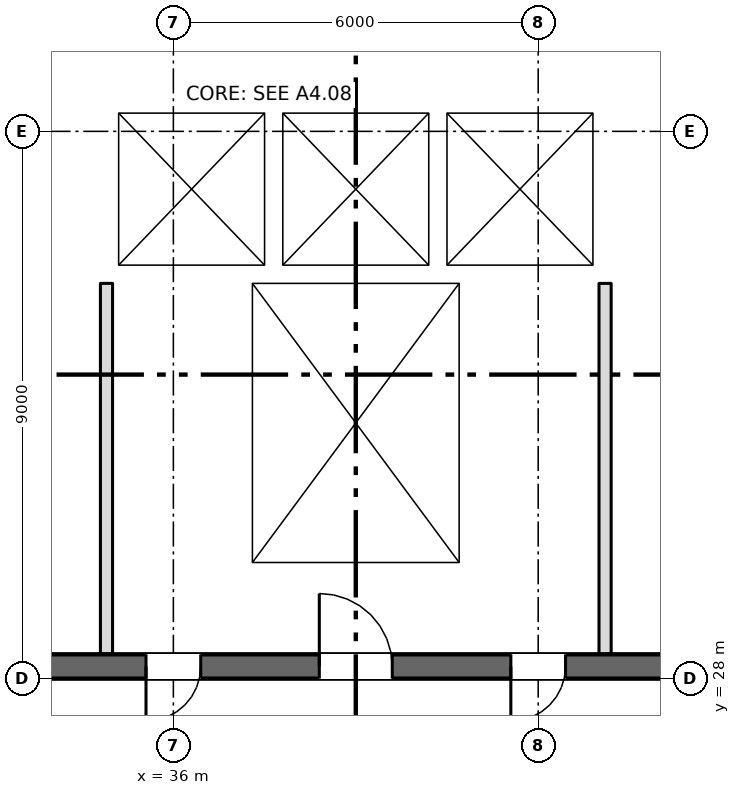
"""IFC4 building model, lengths in metres.
Left out: names, types, materials, properties, quantities, classifications, styles, units other than length and angle.
Written with IfcOpenShell. Run it as: python <this file> out.ifc"""

import sys

from ifc_helpers import new_model, si_unit, direction, frame, frame_2d, origin, place, context, subcontext, project, spatial, rectangle, extrude, element, fill, save


model = new_model("IFC4")
c1 = context("Model", 3, precision=1e-05, world=origin(), true_north=direction((0.0, 1.0)))
c2 = subcontext(c1, "Body", "Model", "MODEL_VIEW")
j1 = project(units=[si_unit("LENGTHUNIT", "METRE"), si_unit("PLANEANGLEUNIT", "RADIAN")], contexts=[c1])
p1 = place(None, origin())
s1 = spatial("IfcSite", under=j1, at=p1, CompositionType="ELEMENT")
p2 = place(p1, origin())
s2 = spatial("IfcBuilding", under=s1, at=p2, CompositionType="ELEMENT")
p3 = place(p2, frame((0.0, 0.0, 30.0)))
s3 = spatial("IfcBuildingStorey", under=s2, at=p3, CompositionType="ELEMENT", Elevation=30.0)
p4 = place(p3, frame((6.7, 28.2, 0.0), z_axis=(0.0, 0.0, 1.0), x_axis=(1.0, 0.0, 0.0)))
e1 = element("IfcWall", 1, at=p4, inside=s3, PredefinedType="SHEAR", context=c2, shape_type="SweptSolid", body=[
    extrude(rectangle(XDim=57.8, YDim=0.4, at=frame_2d((28.9, 0.0))), origin(), (0.0, 0.0, 1.0), 3.35),
])
p5 = place(p4, frame((12.062, 0.0, 0.0)))
e2 = element("IfcOpeningElement", 2, at=p5, cuts=e1, PredefinedType="OPENING", context=c2, shape_type="SweptSolid", body=[
    extrude(rectangle(XDim=0.9, YDim=2.1, at=frame_2d((0.45, 1.05))), frame((0.0, 0.21, 0.0), z_axis=(0.0, -1.0, 0.0), x_axis=(1.0, 0.0, 0.0)), (0.0, 0.0, 1.0), 0.42),
])
p6 = place(p4, frame((14.637, 0.0, 0.0)))
e3 = element("IfcOpeningElement", 3, at=p6, cuts=e1, PredefinedType="OPENING", context=c2, shape_type="SweptSolid", body=[
    extrude(rectangle(XDim=0.9, YDim=2.1, at=frame_2d((0.45, 1.05))), frame((0.0, 0.21, 0.0), z_axis=(0.0, -1.0, 0.0), x_axis=(1.0, 0.0, 0.0)), (0.0, 0.0, 1.0), 0.42),
])
p7 = place(p4, frame((49.062, 0.0, 0.0)))
e4 = element("IfcOpeningElement", 4, at=p7, cuts=e1, PredefinedType="OPENING", context=c2, shape_type="SweptSolid", body=[
    extrude(rectangle(XDim=0.9, YDim=2.1, at=frame_2d((0.45, 1.05))), frame((0.0, 0.21, 0.0), z_axis=(0.0, -1.0, 0.0), x_axis=(1.0, 0.0, 0.0)), (0.0, 0.0, 1.0), 0.42),
])
p8 = place(p4, frame((51.637, 0.0, 0.0)))
e5 = element("IfcOpeningElement", 5, at=p8, cuts=e1, PredefinedType="OPENING", context=c2, shape_type="SweptSolid", body=[
    extrude(rectangle(XDim=0.9, YDim=2.1, at=frame_2d((0.45, 1.05))), frame((0.0, 0.21, 0.0), z_axis=(0.0, -1.0, 0.0), x_axis=(1.0, 0.0, 0.0)), (0.0, 0.0, 1.0), 0.42),
])
p9 = place(p4, frame((1.35, 0.0, 0.0)))
e6 = element("IfcOpeningElement", 6, at=p9, cuts=e1, PredefinedType="OPENING", context=c2, shape_type="SweptSolid", body=[
    extrude(rectangle(XDim=0.9, YDim=2.1, at=frame_2d((0.45, 1.05))), frame((0.0, 0.21, 0.0), z_axis=(0.0, -1.0, 0.0), x_axis=(1.0, 0.0, 0.0)), (0.0, 0.0, 1.0), 0.42),
])
p10 = place(p4, frame((4.7, 0.0, 0.0)))
e7 = element("IfcOpeningElement", 7, at=p10, cuts=e1, PredefinedType="OPENING", context=c2, shape_type="SweptSolid", body=[
    extrude(rectangle(XDim=1.2, YDim=2.1, at=frame_2d((0.6, 1.05))), frame((0.0, 0.21, 0.0), z_axis=(0.0, -1.0, 0.0), x_axis=(1.0, 0.0, 0.0)), (0.0, 0.0, 1.0), 0.42),
])
p11 = place(p4, frame((31.7, 0.0, 0.0)))
e8 = element("IfcOpeningElement", 8, at=p11, cuts=e1, PredefinedType="OPENING", context=c2, shape_type="SweptSolid", body=[
    extrude(rectangle(XDim=1.2, YDim=2.1, at=frame_2d((0.6, 1.05))), frame((0.0, 0.21, 0.0), z_axis=(0.0, -1.0, 0.0), x_axis=(1.0, 0.0, 0.0)), (0.0, 0.0, 1.0), 0.42),
])
p12 = place(p4, frame((55.2, 0.0, 0.0)))
e9 = element("IfcOpeningElement", 9, at=p12, cuts=e1, PredefinedType="OPENING", context=c2, shape_type="SweptSolid", body=[
    extrude(rectangle(XDim=1.2, YDim=2.1, at=frame_2d((0.6, 1.05))), frame((0.0, 0.21, 0.0), z_axis=(0.0, -1.0, 0.0), x_axis=(1.0, 0.0, 0.0)), (0.0, 0.0, 1.0), 0.42),
])
p13 = place(p4, frame((21.7, 0.0, 0.0)))
e10 = element("IfcOpeningElement", 10, at=p13, cuts=e1, PredefinedType="OPENING", context=c2, shape_type="SweptSolid", body=[
    extrude(rectangle(XDim=1.2, YDim=2.1, at=frame_2d((0.6, 1.05))), frame((0.0, 0.21, 0.0), z_axis=(0.0, -1.0, 0.0), x_axis=(1.0, 0.0, 0.0)), (0.0, 0.0, 1.0), 0.42),
])
p14 = place(p4, frame((41.7, 0.0, 0.0)))
e11 = element("IfcOpeningElement", 11, at=p14, cuts=e1, PredefinedType="OPENING", context=c2, shape_type="SweptSolid", body=[
    extrude(rectangle(XDim=1.2, YDim=2.1, at=frame_2d((0.6, 1.05))), frame((0.0, 0.21, 0.0), z_axis=(0.0, -1.0, 0.0), x_axis=(1.0, 0.0, 0.0)), (0.0, 0.0, 1.0), 0.42),
])
p15 = place(p4, frame((24.85, 0.0, 0.0)))
e12 = element("IfcOpeningElement", 12, at=p15, cuts=e1, PredefinedType="OPENING", context=c2, shape_type="SweptSolid", body=[
    extrude(rectangle(XDim=2.4, YDim=2.1, at=frame_2d((1.2, 1.05))), frame((0.0, 0.21, 0.0), z_axis=(0.0, -1.0, 0.0), x_axis=(1.0, 0.0, 0.0)), (0.0, 0.0, 1.0), 0.42),
])
p16 = place(p4, frame((37.35, 0.0, 0.0)))
e13 = element("IfcOpeningElement", 13, at=p16, cuts=e1, PredefinedType="OPENING", context=c2, shape_type="SweptSolid", body=[
    extrude(rectangle(XDim=2.4, YDim=2.1, at=frame_2d((1.2, 1.05))), frame((0.0, 0.21, 0.0), z_axis=(0.0, -1.0, 0.0), x_axis=(1.0, 0.0, 0.0)), (0.0, 0.0, 1.0), 0.42),
])
p17 = place(p4, frame((7.85, 0.0, 0.0)))
e14 = element("IfcOpeningElement", 14, at=p17, cuts=e1, PredefinedType="OPENING", context=c2, shape_type="SweptSolid", body=[
    extrude(rectangle(XDim=2.4, YDim=2.1, at=frame_2d((1.2, 1.05))), frame((0.0, 0.21, 0.0), z_axis=(0.0, -1.0, 0.0), x_axis=(1.0, 0.0, 0.0)), (0.0, 0.0, 1.0), 0.42),
])
p18 = place(p4, frame((28.85, 0.0, 0.0)))
e15 = element("IfcOpeningElement", 15, at=p18, cuts=e1, PredefinedType="OPENING", context=c2, shape_type="SweptSolid", body=[
    extrude(rectangle(XDim=0.9, YDim=2.1, at=frame_2d((0.45, 1.05))), frame((0.0, 0.21, 0.0), z_axis=(0.0, -1.0, 0.0), x_axis=(1.0, 0.0, 0.0)), (0.0, 0.0, 1.0), 0.42),
])
p19 = place(p4, frame((34.85, 0.0, 0.0)))
e16 = element("IfcOpeningElement", 16, at=p19, cuts=e1, PredefinedType="OPENING", context=c2, shape_type="SweptSolid", body=[
    extrude(rectangle(XDim=0.9, YDim=2.1, at=frame_2d((0.45, 1.05))), frame((0.0, 0.21, 0.0), z_axis=(0.0, -1.0, 0.0), x_axis=(1.0, 0.0, 0.0)), (0.0, 0.0, 1.0), 0.42),
])
for number, where, z_axis, x_axis in (
    (17, (37.15, 28.4, 0.0), (0.0, 0.0, 1.0), (0.0, 1.0, 0.0)),
    (18, (40.85, 28.4, 0.0), (0.0, 0.0, 1.0), (0.0, 1.0, 0.0)),
):
    element("IfcWall", number, at=place(p3, frame(where, z_axis=z_axis, x_axis=x_axis)), inside=s3, PredefinedType="SHEAR", context=c2, shape_type="SweptSolid", body=[
        extrude(rectangle(XDim=6.1, YDim=0.3, at=frame_2d((3.05, 0.0))), origin(), (0.0, 0.0, 1.0), 3.35),
    ])
p20 = place(p3, frame((34.8, 34.65, 0.0), z_axis=(0.0, 0.0, 1.0), x_axis=(1.0, 0.0, 0.0)))
e19 = element("IfcWall", 19, at=p20, inside=s3, PredefinedType="SHEAR", context=c2, shape_type="SweptSolid", body=[
    extrude(rectangle(XDim=8.4, YDim=0.3, at=frame_2d((4.2, 0.0))), origin(), (0.0, 0.0, 1.0), 3.35),
])
p21 = place(p3, frame((34.8, 37.45, 0.0), z_axis=(0.0, 0.0, 1.0), x_axis=(1.0, 0.0, 0.0)))
e20 = element("IfcWall", 20, at=p21, inside=s3, PredefinedType="SHEAR", context=c2, shape_type="SweptSolid", body=[
    extrude(rectangle(XDim=8.4, YDim=0.3, at=frame_2d((4.2, 0.0))), origin(), (0.0, 0.0, 1.0), 3.35),
])
p22 = place(p21, frame((0.95, 0.0, 0.0)))
e21 = element("IfcOpeningElement", 21, at=p22, cuts=e20, PredefinedType="OPENING", context=c2, shape_type="SweptSolid", body=[
    extrude(rectangle(XDim=1.1, YDim=2.1, at=frame_2d((0.55, 1.05))), frame((0.0, 0.16, 0.0), z_axis=(0.0, -1.0, 0.0), x_axis=(1.0, 0.0, 0.0)), (0.0, 0.0, 1.0), 0.32),
])
p23 = place(p21, frame((3.65, 0.0, 0.0)))
e22 = element("IfcOpeningElement", 22, at=p23, cuts=e20, PredefinedType="OPENING", context=c2, shape_type="SweptSolid", body=[
    extrude(rectangle(XDim=1.1, YDim=2.1, at=frame_2d((0.55, 1.05))), frame((0.0, 0.16, 0.0), z_axis=(0.0, -1.0, 0.0), x_axis=(1.0, 0.0, 0.0)), (0.0, 0.0, 1.0), 0.32),
])
p24 = place(p21, frame((6.35, 0.0, 0.0)))
e23 = element("IfcOpeningElement", 23, at=p24, cuts=e20, PredefinedType="OPENING", context=c2, shape_type="SweptSolid", body=[
    extrude(rectangle(XDim=1.1, YDim=2.1, at=frame_2d((0.55, 1.05))), frame((0.0, 0.16, 0.0), z_axis=(0.0, -1.0, 0.0), x_axis=(1.0, 0.0, 0.0)), (0.0, 0.0, 1.0), 0.32),
])
for number, where, z_axis, x_axis in (
    (24, (34.95, 34.8, 0.0), (0.0, 0.0, 1.0), (0.0, 1.0, 0.0)),
    (25, (43.05, 34.8, 0.0), (0.0, 0.0, 1.0), (0.0, 1.0, 0.0)),
    (26, (37.65, 34.8, 0.0), (0.0, 0.0, 1.0), (0.0, 1.0, 0.0)),
    (27, (40.35, 34.8, 0.0), (0.0, 0.0, 1.0), (0.0, 1.0, 0.0)),
):
    element("IfcWall", number, at=place(p3, frame(where, z_axis=z_axis, x_axis=x_axis)), inside=s3, PredefinedType="SHEAR", context=c2, shape_type="SweptSolid", body=[
        extrude(rectangle(XDim=2.5, YDim=0.3, at=frame_2d((1.25, 0.0))), origin(), (0.0, 0.0, 1.0), 3.35),
    ])
for number, where, z_axis, x_axis in (
    (28, (34.9, 28.4, 0.0), (0.0, 0.0, 1.0), (0.0, 1.0, 0.0)),
    (29, (43.1, 28.4, 0.0), (0.0, 0.0, 1.0), (0.0, 1.0, 0.0)),
):
    element("IfcWall", number, at=place(p3, frame(where, z_axis=z_axis, x_axis=x_axis)), inside=s3, PredefinedType="PARTITIONING", context=c2, shape_type="SweptSolid", body=[
        extrude(rectangle(XDim=6.1, YDim=0.2, at=frame_2d((3.05, 0.0))), origin(), (0.0, 0.0, 1.0), 3.35),
    ])
p25 = place(p22, origin())
e30 = element("IfcDoor", 30, at=p25, inside=s3, OperationType="SLIDING_TO_LEFT", PredefinedType="DOOR", context=c2, shape_type="SweptSolid", body=[
    extrude(rectangle(XDim=1.1, YDim=2.1, at=frame_2d((0.55, 1.05))), frame((0.0, 0.025, 0.0), z_axis=(0.0, -1.0, 0.0), x_axis=(1.0, 0.0, 0.0)), (0.0, 0.0, 1.0), 0.05),
])
fill(e21, e30)
p26 = place(p23, origin())
e31 = element("IfcDoor", 31, at=p26, inside=s3, OperationType="SLIDING_TO_LEFT", PredefinedType="DOOR", context=c2, shape_type="SweptSolid", body=[
    extrude(rectangle(XDim=1.1, YDim=2.1, at=frame_2d((0.55, 1.05))), frame((0.0, 0.025, 0.0), z_axis=(0.0, -1.0, 0.0), x_axis=(1.0, 0.0, 0.0)), (0.0, 0.0, 1.0), 0.05),
])
fill(e22, e31)
p27 = place(p24, origin())
e32 = element("IfcDoor", 32, at=p27, inside=s3, OperationType="SLIDING_TO_LEFT", PredefinedType="DOOR", context=c2, shape_type="SweptSolid", body=[
    extrude(rectangle(XDim=1.1, YDim=2.1, at=frame_2d((0.55, 1.05))), frame((0.0, 0.025, 0.0), z_axis=(0.0, -1.0, 0.0), x_axis=(1.0, 0.0, 0.0)), (0.0, 0.0, 1.0), 0.05),
])
fill(e23, e32)
p28 = place(p11, origin())
e33 = element("IfcDoor", 33, at=p28, inside=s3, OperationType="SINGLE_SWING_LEFT", PredefinedType="DOOR", context=c2, shape_type="SweptSolid", body=[
    extrude(rectangle(XDim=1.2, YDim=2.1, at=frame_2d((0.6, 1.05))), frame((0.0, 0.025, 0.0), z_axis=(0.0, -1.0, 0.0), x_axis=(1.0, 0.0, 0.0)), (0.0, 0.0, 1.0), 0.05),
])
fill(e8, e33)
p29 = place(p18, origin())
e34 = element("IfcDoor", 34, at=p29, inside=s3, OperationType="SINGLE_SWING_LEFT", PredefinedType="DOOR", context=c2, shape_type="SweptSolid", body=[
    extrude(rectangle(XDim=0.9, YDim=2.1, at=frame_2d((0.45, 1.05))), frame((0.0, 0.025, 0.0), z_axis=(0.0, -1.0, 0.0), x_axis=(1.0, 0.0, 0.0)), (0.0, 0.0, 1.0), 0.05),
])
fill(e15, e34)
p30 = place(p19, origin())
e35 = element("IfcDoor", 35, at=p30, inside=s3, OperationType="SINGLE_SWING_LEFT", PredefinedType="DOOR", context=c2, shape_type="SweptSolid", body=[
    extrude(rectangle(XDim=0.9, YDim=2.1, at=frame_2d((0.45, 1.05))), frame((0.0, 0.025, 0.0), z_axis=(0.0, -1.0, 0.0), x_axis=(1.0, 0.0, 0.0)), (0.0, 0.0, 1.0), 0.05),
])
fill(e16, e35)
save(model, sys.argv[1])
